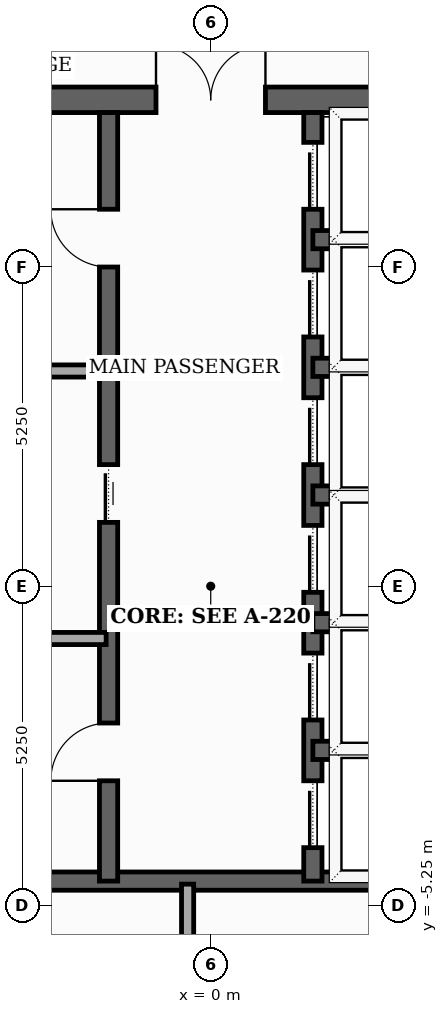
"""IFC4 building model, lengths in metres.
Left out: names, types, materials, properties, quantities, classifications, styles, units other than length and angle.
Written with IfcOpenShell. Run it as: python <this file> out.ifc"""

import sys

from ifc_helpers import new_model, si_unit, direction, frame, frame_2d, origin, place, context, subcontext, project, spatial, rectangle, extrude, element, fill, save


model = new_model("IFC4")
c1 = context("Model", 3, precision=1e-05, world=origin(), true_north=direction((0.0, 1.0)))
c2 = subcontext(c1, "Body", "Model", "MODEL_VIEW")
j1 = project(units=[si_unit("LENGTHUNIT", "METRE"), si_unit("PLANEANGLEUNIT", "RADIAN")], contexts=[c1])
p1 = place(None, origin())
s1 = spatial("IfcSite", under=j1, at=p1, CompositionType="ELEMENT")
p2 = place(p1, origin())
s2 = spatial("IfcBuilding", under=s1, at=p2, CompositionType="ELEMENT")
p3 = place(p2, frame((0.0, 0.0, 191.6)))
s3 = spatial("IfcBuildingStorey", under=s2, at=p3, CompositionType="ELEMENT", Elevation=191.6)
p4 = place(p3, frame((-8.0, 8.0, 0.0), z_axis=(0.0, 0.0, 1.0), x_axis=(1.0, 0.0, 0.0)))
e1 = element("IfcWall", 1, at=p4, inside=s3, PredefinedType="SHEAR", context=c2, shape_type="SweptSolid", body=[
    extrude(rectangle(XDim=16.0, YDim=0.42, at=frame_2d((8.0, 0.0))), origin(), (0.0, 0.0, 1.0), 3.5),
])
p5 = place(p4, frame((7.1, 0.0, 0.0)))
e2 = element("IfcOpeningElement", 2, at=p5, cuts=e1, PredefinedType="OPENING", context=c2, shape_type="SweptSolid", body=[
    extrude(rectangle(XDim=1.8, YDim=2.15, at=frame_2d((0.9, 1.075))), frame((0.0, 0.22, 0.0), z_axis=(0.0, -1.0, 0.0), x_axis=(1.0, 0.0, 0.0)), (0.0, 0.0, 1.0), 0.44),
])
p6 = place(p3, frame((-4.45, -4.85, 0.0), z_axis=(0.0, 0.0, 1.0), x_axis=(1.0, 0.0, 0.0)))
e3 = element("IfcWall", 3, at=p6, inside=s3, PredefinedType="SHEAR", context=c2, shape_type="SweptSolid", body=[
    extrude(rectangle(XDim=8.9, YDim=0.3, at=frame_2d((4.45, 0.0))), origin(), (0.0, 0.0, 1.0), 3.5),
])
p7 = place(p3, frame((-1.68, -4.85, 0.0), z_axis=(0.0, 0.0, 1.0), x_axis=(0.0, 1.0, 0.0)))
e4 = element("IfcWall", 4, at=p7, inside=s3, PredefinedType="SHEAR", context=c2, shape_type="SweptSolid", body=[
    extrude(rectangle(XDim=12.64, YDim=0.3, at=frame_2d((6.32, 0.0))), origin(), (0.0, 0.0, 1.0), 3.5),
])
p8 = place(p7, frame((1.65, 0.0, 0.0)))
e5 = element("IfcOpeningElement", 5, at=p8, cuts=e4, PredefinedType="OPENING", context=c2, shape_type="SweptSolid", body=[
    extrude(rectangle(XDim=0.95, YDim=2.1, at=frame_2d((0.475, 1.05))), frame((0.0, 0.16, 0.0), z_axis=(0.0, -1.0, 0.0), x_axis=(1.0, 0.0, 0.0)), (0.0, 0.0, 1.0), 0.32),
])
p9 = place(p7, frame((5.9, 0.0, 0.0)))
e6 = element("IfcOpeningElement", 6, at=p9, cuts=e4, PredefinedType="OPENING", context=c2, shape_type="SweptSolid", body=[
    extrude(rectangle(XDim=0.95, YDim=2.1, at=frame_2d((0.475, 1.05))), frame((0.0, 0.16, 0.0), z_axis=(0.0, -1.0, 0.0), x_axis=(1.0, 0.0, 0.0)), (0.0, 0.0, 1.0), 0.32),
])
p10 = place(p7, frame((10.1, 0.0, 0.0)))
e7 = element("IfcOpeningElement", 7, at=p10, cuts=e4, PredefinedType="OPENING", context=c2, shape_type="SweptSolid", body=[
    extrude(rectangle(XDim=0.95, YDim=2.1, at=frame_2d((0.475, 1.05))), frame((0.0, 0.16, 0.0), z_axis=(0.0, -1.0, 0.0), x_axis=(1.0, 0.0, 0.0)), (0.0, 0.0, 1.0), 0.32),
])
p11 = place(p3, frame((1.68, -4.85, 0.0), z_axis=(0.0, 0.0, 1.0), x_axis=(0.0, 1.0, 0.0)))
e8 = element("IfcWall", 8, at=p11, inside=s3, PredefinedType="SHEAR", context=c2, shape_type="SweptSolid", body=[
    extrude(rectangle(XDim=12.64, YDim=0.3, at=frame_2d((6.32, 0.0))), origin(), (0.0, 0.0, 1.0), 3.5),
])
p12 = place(p11, frame((0.55, 0.0, 0.0)))
e9 = element("IfcOpeningElement", 9, at=p12, cuts=e8, PredefinedType="OPENING", context=c2, shape_type="SweptSolid", body=[
    extrude(rectangle(XDim=1.1, YDim=2.1, at=frame_2d((0.55, 1.05))), frame((0.0, 0.16, 0.0), z_axis=(0.0, -1.0, 0.0), x_axis=(1.0, 0.0, 0.0)), (0.0, 0.0, 1.0), 0.32),
])
p13 = place(p11, frame((2.65, 0.0, 0.0)))
e10 = element("IfcOpeningElement", 10, at=p13, cuts=e8, PredefinedType="OPENING", context=c2, shape_type="SweptSolid", body=[
    extrude(rectangle(XDim=1.1, YDim=2.1, at=frame_2d((0.55, 1.05))), frame((0.0, 0.16, 0.0), z_axis=(0.0, -1.0, 0.0), x_axis=(1.0, 0.0, 0.0)), (0.0, 0.0, 1.0), 0.32),
])
p14 = place(p11, frame((4.75, 0.0, 0.0)))
e11 = element("IfcOpeningElement", 11, at=p14, cuts=e8, PredefinedType="OPENING", context=c2, shape_type="SweptSolid", body=[
    extrude(rectangle(XDim=1.1, YDim=2.1, at=frame_2d((0.55, 1.05))), frame((0.0, 0.16, 0.0), z_axis=(0.0, -1.0, 0.0), x_axis=(1.0, 0.0, 0.0)), (0.0, 0.0, 1.0), 0.32),
])
p15 = place(p11, frame((6.85, 0.0, 0.0)))
e12 = element("IfcOpeningElement", 12, at=p15, cuts=e8, PredefinedType="OPENING", context=c2, shape_type="SweptSolid", body=[
    extrude(rectangle(XDim=1.1, YDim=2.1, at=frame_2d((0.55, 1.05))), frame((0.0, 0.16, 0.0), z_axis=(0.0, -1.0, 0.0), x_axis=(1.0, 0.0, 0.0)), (0.0, 0.0, 1.0), 0.32),
])
p16 = place(p11, frame((8.95, 0.0, 0.0)))
e13 = element("IfcOpeningElement", 13, at=p16, cuts=e8, PredefinedType="OPENING", context=c2, shape_type="SweptSolid", body=[
    extrude(rectangle(XDim=1.1, YDim=2.1, at=frame_2d((0.55, 1.05))), frame((0.0, 0.16, 0.0), z_axis=(0.0, -1.0, 0.0), x_axis=(1.0, 0.0, 0.0)), (0.0, 0.0, 1.0), 0.32),
])
p17 = place(p11, frame((11.05, 0.0, 0.0)))
e14 = element("IfcOpeningElement", 14, at=p17, cuts=e8, PredefinedType="OPENING", context=c2, shape_type="SweptSolid", body=[
    extrude(rectangle(XDim=1.1, YDim=2.1, at=frame_2d((0.55, 1.05))), frame((0.0, 0.16, 0.0), z_axis=(0.0, -1.0, 0.0), x_axis=(1.0, 0.0, 0.0)), (0.0, 0.0, 1.0), 0.32),
])
for number, where, z_axis, x_axis in (
    (15, (1.68, 1.5, 0.0), (0.0, 0.0, 1.0), (1.0, 0.0, 0.0)),
    (16, (1.68, 3.6, 0.0), (0.0, 0.0, 1.0), (1.0, 0.0, 0.0)),
    (17, (1.68, 5.7, 0.0), (0.0, 0.0, 1.0), (1.0, 0.0, 0.0)),
    (18, (1.68, -2.7, 0.0), (0.0, 0.0, 1.0), (1.0, 0.0, 0.0)),
    (19, (1.68, -0.6, 0.0), (0.0, 0.0, 1.0), (1.0, 0.0, 0.0)),
):
    element("IfcWall", number, at=place(p3, frame(where, z_axis=z_axis, x_axis=x_axis)), inside=s3, PredefinedType="SHEAR", context=c2, shape_type="SweptSolid", body=[
        extrude(rectangle(XDim=2.77, YDim=0.3, at=frame_2d((1.385, 0.0))), origin(), (0.0, 0.0, 1.0), 3.5),
    ])
p18 = place(p3, frame((-0.38, -7.85, 0.0), z_axis=(0.0, 0.0, 1.0), x_axis=(0.0, 1.0, 0.0)))
e20 = element("IfcWall", 20, at=p18, inside=s3, PredefinedType="SOLIDWALL", context=c2, shape_type="SweptSolid", body=[
    extrude(rectangle(XDim=2.95, YDim=0.2, at=frame_2d((1.475, 0.0))), origin(), (0.0, 0.0, 1.0), 2.885),
])
for number, where, z_axis, x_axis in (
    (21, (-4.4, -0.86, 0.0), (0.0, 0.0, 1.0), (1.0, 0.0, 0.0)),
    (22, (-4.4, 3.54, 0.0), (0.0, 0.0, 1.0), (1.0, 0.0, 0.0)),
):
    element("IfcWall", number, at=place(p3, frame(where, z_axis=z_axis, x_axis=x_axis)), inside=s3, PredefinedType="SOLIDWALL", context=c2, shape_type="SweptSolid", body=[
        extrude(rectangle(XDim=2.68, YDim=0.2, at=frame_2d((1.34, 0.0))), origin(), (0.0, 0.0, 1.0), 3.5),
    ])
p19 = place(p5, origin())
e23 = element("IfcDoor", 23, at=p19, inside=s3, OperationType="DOUBLE_DOOR_SINGLE_SWING", PredefinedType="DOOR", context=c2, shape_type="SweptSolid", body=[
    extrude(rectangle(XDim=1.8, YDim=2.15, at=frame_2d((0.9, 1.075))), frame((0.0, 0.025, 0.0), z_axis=(0.0, -1.0, 0.0), x_axis=(1.0, 0.0, 0.0)), (0.0, 0.0, 1.0), 0.05),
])
fill(e2, e23)
p20 = place(p8, origin())
e24 = element("IfcDoor", 24, at=p20, inside=s3, OperationType="SINGLE_SWING_LEFT", PredefinedType="DOOR", context=c2, shape_type="SweptSolid", body=[
    extrude(rectangle(XDim=0.95, YDim=2.1, at=frame_2d((0.475, 1.05))), frame((0.0, 0.025, 0.0), z_axis=(0.0, -1.0, 0.0), x_axis=(1.0, 0.0, 0.0)), (0.0, 0.0, 1.0), 0.05),
])
fill(e5, e24)
p21 = place(p9, origin())
e25 = element("IfcDoor", 25, at=p21, inside=s3, OperationType="SLIDING_TO_LEFT", PredefinedType="DOOR", context=c2, shape_type="SweptSolid", body=[
    extrude(rectangle(XDim=0.95, YDim=2.1, at=frame_2d((0.475, 1.05))), frame((0.0, 0.025, 0.0), z_axis=(0.0, -1.0, 0.0), x_axis=(1.0, 0.0, 0.0)), (0.0, 0.0, 1.0), 0.05),
])
fill(e6, e25)
p22 = place(p10, origin())
e26 = element("IfcDoor", 26, at=p22, inside=s3, OperationType="SINGLE_SWING_RIGHT", PredefinedType="DOOR", context=c2, shape_type="SweptSolid", body=[
    extrude(rectangle(XDim=0.95, YDim=2.1, at=frame_2d((0.475, 1.05))), frame((0.0, 0.025, 0.0), z_axis=(0.0, -1.0, 0.0), x_axis=(1.0, 0.0, 0.0)), (0.0, 0.0, 1.0), 0.05),
])
fill(e7, e26)
p23 = place(p12, origin())
e27 = element("IfcDoor", 27, at=p23, inside=s3, OperationType="SLIDING_TO_LEFT", PredefinedType="DOOR", context=c2, shape_type="SweptSolid", body=[
    extrude(rectangle(XDim=1.1, YDim=2.1, at=frame_2d((0.55, 1.05))), frame((0.0, 0.025, 0.0), z_axis=(0.0, -1.0, 0.0), x_axis=(1.0, 0.0, 0.0)), (0.0, 0.0, 1.0), 0.05),
])
fill(e9, e27)
p24 = place(p13, origin())
e28 = element("IfcDoor", 28, at=p24, inside=s3, OperationType="SLIDING_TO_LEFT", PredefinedType="DOOR", context=c2, shape_type="SweptSolid", body=[
    extrude(rectangle(XDim=1.1, YDim=2.1, at=frame_2d((0.55, 1.05))), frame((0.0, 0.025, 0.0), z_axis=(0.0, -1.0, 0.0), x_axis=(1.0, 0.0, 0.0)), (0.0, 0.0, 1.0), 0.05),
])
fill(e10, e28)
p25 = place(p14, origin())
e29 = element("IfcDoor", 29, at=p25, inside=s3, OperationType="SLIDING_TO_LEFT", PredefinedType="DOOR", context=c2, shape_type="SweptSolid", body=[
    extrude(rectangle(XDim=1.1, YDim=2.1, at=frame_2d((0.55, 1.05))), frame((0.0, 0.025, 0.0), z_axis=(0.0, -1.0, 0.0), x_axis=(1.0, 0.0, 0.0)), (0.0, 0.0, 1.0), 0.05),
])
fill(e11, e29)
p26 = place(p15, origin())
e30 = element("IfcDoor", 30, at=p26, inside=s3, OperationType="SLIDING_TO_LEFT", PredefinedType="DOOR", context=c2, shape_type="SweptSolid", body=[
    extrude(rectangle(XDim=1.1, YDim=2.1, at=frame_2d((0.55, 1.05))), frame((0.0, 0.025, 0.0), z_axis=(0.0, -1.0, 0.0), x_axis=(1.0, 0.0, 0.0)), (0.0, 0.0, 1.0), 0.05),
])
fill(e12, e30)
p27 = place(p16, origin())
e31 = element("IfcDoor", 31, at=p27, inside=s3, OperationType="SLIDING_TO_LEFT", PredefinedType="DOOR", context=c2, shape_type="SweptSolid", body=[
    extrude(rectangle(XDim=1.1, YDim=2.1, at=frame_2d((0.55, 1.05))), frame((0.0, 0.025, 0.0), z_axis=(0.0, -1.0, 0.0), x_axis=(1.0, 0.0, 0.0)), (0.0, 0.0, 1.0), 0.05),
])
fill(e13, e31)
p28 = place(p17, origin())
e32 = element("IfcDoor", 32, at=p28, inside=s3, OperationType="SLIDING_TO_LEFT", PredefinedType="DOOR", context=c2, shape_type="SweptSolid", body=[
    extrude(rectangle(XDim=1.1, YDim=2.1, at=frame_2d((0.55, 1.05))), frame((0.0, 0.025, 0.0), z_axis=(0.0, -1.0, 0.0), x_axis=(1.0, 0.0, 0.0)), (0.0, 0.0, 1.0), 0.05),
])
fill(e14, e32)
save(model, sys.argv[1])
